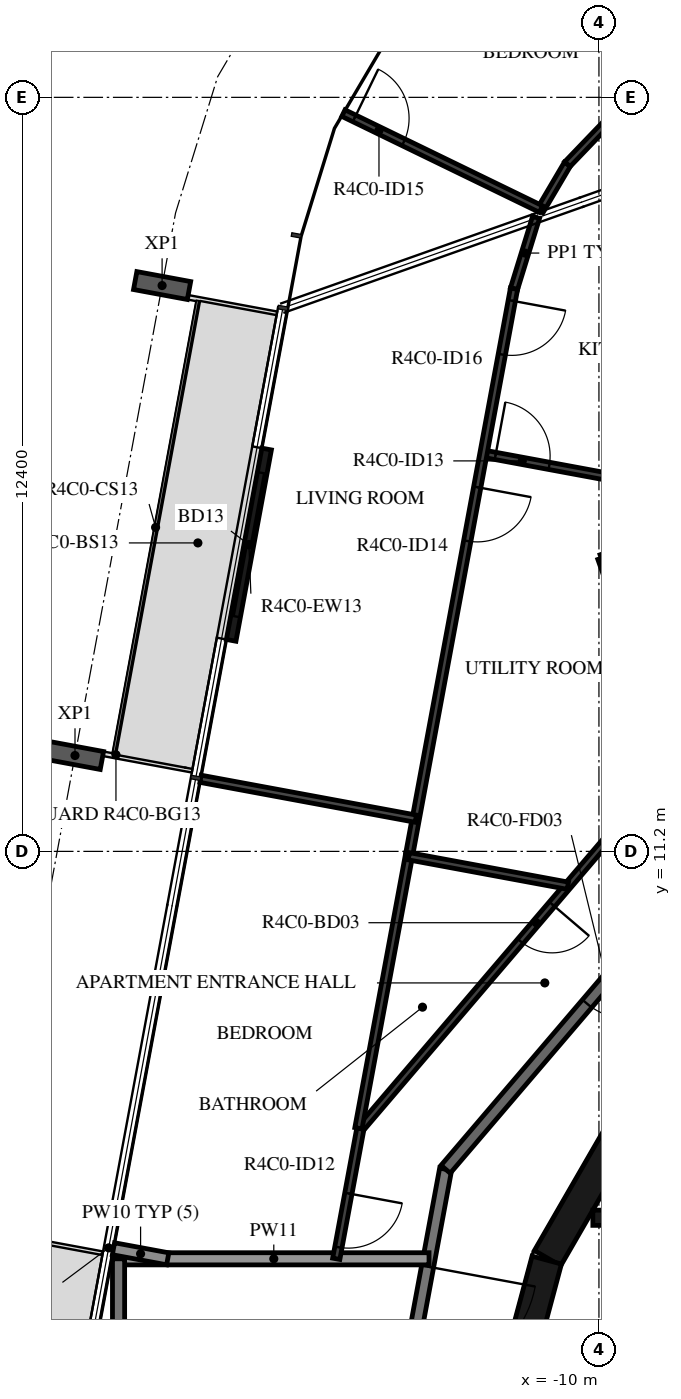
"""IFC4 building model, lengths in metres.
Left out: names, types, materials, properties, quantities, classifications, styles, units other than length and angle.
Written with IfcOpenShell. Run it as: python <this file> out.ifc"""

import sys

from ifc_helpers import new_model, si_unit, direction, frame, frame_2d, origin, origin_2d, place, context, subcontext, project, spatial, rectangle, i_section, extrude, element, fill, save


model = new_model("IFC4")
c1 = context("Model", 3, precision=1e-05, world=origin(), true_north=direction((0.0, 1.0)))
c2 = subcontext(c1, "Body", "Model", "MODEL_VIEW")
j1 = project(units=[si_unit("LENGTHUNIT", "METRE"), si_unit("PLANEANGLEUNIT", "RADIAN")], contexts=[c1])
p1 = place(None, origin())
s1 = spatial("IfcSite", under=j1, at=p1, CompositionType="ELEMENT")
p2 = place(p1, origin())
s2 = spatial("IfcBuilding", under=s1, at=p2, CompositionType="ELEMENT")
p3 = place(p2, frame((0.0, 0.0, 172.7)))
s3 = spatial("IfcBuildingStorey", under=s2, at=p3, CompositionType="ELEMENT", Elevation=172.7)
for number, where, z_axis, x_axis in (
    (1, (-17.184, 20.505, -0.38), (0.0, 0.0, 1.0), (0.182, 0.983, 0.0)),
    (2, (-18.616, 12.777, -0.38), (0.0, 0.0, 1.0), (0.182, 0.983, 0.0)),
):
    element("IfcColumn", number, at=place(p3, frame(where, z_axis=z_axis, x_axis=x_axis)), inside=s3, PredefinedType="COLUMN", context=c2, shape_type="SweptSolid", body=[
        extrude(i_section(OverallWidth=0.3, OverallDepth=0.9, WebThickness=0.019, FlangeThickness=0.035, FilletRadius=0.03, at=origin_2d()), origin(), (0.0, 0.0, 1.0), 3.5),
    ])
p4 = place(p3, frame((-15.465, 17.817, 0.0), z_axis=(0.0, 0.0, 1.0), x_axis=(-0.182201278434, -0.983261254264, 0.0)))
e3 = element("IfcWall", 3, at=p4, inside=s3, PredefinedType="STANDARD", context=c2, shape_type="SweptSolid", body=[
    extrude(rectangle(XDim=3.2, YDim=0.16, at=frame_2d((1.6, 0.0))), origin(), (0.0, 0.0, 1.0), 3.12),
])
p5 = place(p4, frame((0.4, 0.0, 0.0)))
e4 = element("IfcOpeningElement", 4, at=p5, cuts=e3, PredefinedType="OPENING", context=c2, shape_type="SweptSolid", body=[
    extrude(rectangle(XDim=2.4, YDim=2.4, at=frame_2d((1.2, 1.2))), frame((0.0, 0.09, 0.0), z_axis=(0.0, -1.0, 0.0), x_axis=(1.0, 0.0, 0.0)), (0.0, 0.0, 1.0), 0.18),
])
for number, where, z_axis, x_axis in (
    (5, (-9.329, 7.137, 0.0), (0.0, 0.0, 1.0), (-0.5, -0.866, 0.0)),
    (6, (-10.858, 4.479, 0.0), (0.0, 0.0, 1.0), (-0.259, -0.966, 0.0)),
):
    element("IfcWall", number, at=place(p3, frame(where, z_axis=z_axis, x_axis=x_axis)), inside=s3, PredefinedType="SHEAR", context=c2, shape_type="SweptSolid", body=[
        extrude(rectangle(XDim=3.033, YDim=0.5, at=frame_2d((1.516, 0.0))), origin(), (0.0, 0.0, 1.0), 3.12),
    ])
p6 = place(p3, frame((-7.0, 5.175, 0.0), z_axis=(0.0, 0.0, 1.0), x_axis=(-1.0, 0.0, 0.0)))
e7 = element("IfcWall", 7, at=p6, inside=s3, PredefinedType="SHEAR", context=c2, shape_type="SweptSolid", body=[
    extrude(rectangle(XDim=3.1, YDim=0.25, at=frame_2d((1.55, 0.0))), origin(), (0.0, 0.0, 1.0), 3.12),
])
p7 = place(p3, frame((-12.521, 5.972, 0.0), z_axis=(0.0, 0.0, 1.0), x_axis=(-0.182251559718, -0.983251935661, 0.0)))
e8 = element("IfcWall", 8, at=p7, inside=s3, PredefinedType="STANDARD", context=c2, shape_type="SweptSolid", body=[
    extrude(rectangle(XDim=5.117, YDim=0.2, at=frame_2d((2.559, 0.0))), origin(), (0.0, 0.0, 1.0), 3.12),
])
p8 = place(p7, frame((1.627, 0.0, 0.0)))
e9 = element("IfcOpeningElement", 9, at=p8, cuts=e8, PredefinedType="OPENING", context=c2, shape_type="SweptSolid", body=[
    extrude(rectangle(XDim=1.8, YDim=2.1, at=frame_2d((0.9, 1.05))), frame((0.0, 0.11, 0.0), z_axis=(0.0, -1.0, 0.0), x_axis=(1.0, 0.0, 0.0)), (0.0, 0.0, 1.0), 0.22),
])
p9 = place(p3, frame((-7.858, 11.433, 0.0), z_axis=(0.0, 0.0, 1.0), x_axis=(-0.649440801937, -0.760412154545, 0.0)))
e10 = element("IfcWall", 10, at=p9, inside=s3, PredefinedType="STANDARD", context=c2, shape_type="SweptSolid", body=[
    extrude(rectangle(XDim=7.181, YDim=0.2, at=frame_2d((3.59, 0.0))), origin(), (0.0, 0.0, 1.0), 3.12),
])
p10 = place(p9, frame((2.6, 0.0, 0.0)))
e11 = element("IfcOpeningElement", 11, at=p10, cuts=e10, PredefinedType="OPENING", context=c2, shape_type="SweptSolid", body=[
    extrude(rectangle(XDim=1.0, YDim=2.1, at=frame_2d((0.5, 1.05))), frame((0.0, 0.11, 0.0), z_axis=(0.0, -1.0, 0.0), x_axis=(1.0, 0.0, 0.0)), (0.0, 0.0, 1.0), 0.22),
])
p11 = place(p3, frame((-12.794, 4.5, 0.0), z_axis=(0.0, 0.0, 1.0), x_axis=(-1.0, 0.0, 0.0)))
e12 = element("IfcWall", 12, at=p11, inside=s3, PredefinedType="STANDARD", context=c2, shape_type="SweptSolid", body=[
    extrude(rectangle(XDim=5.106, YDim=0.2, at=frame_2d((2.553, 0.0))), origin(), (0.0, 0.0, 1.0), 2.73),
])
p12 = place(p3, frame((-17.9, 4.5, 0.0), z_axis=(0.0, 0.0, 1.0), x_axis=(0.0, -1.0, 0.0)))
e13 = element("IfcWall", 13, at=p12, inside=s3, PredefinedType="STANDARD", context=c2, shape_type="SweptSolid", body=[
    extrude(rectangle(XDim=9.0, YDim=0.2, at=frame_2d((4.5, 0.0))), origin(), (0.0, 0.0, 1.0), 3.12),
])
p13 = place(p3, frame((-17.984, 4.665, 0.0), z_axis=(0.0, 0.0, 1.0), x_axis=(0.98328378843, -0.182079629313, 0.0)))
e14 = element("IfcWall", 14, at=p13, inside=s3, PredefinedType="STANDARD", context=c2, shape_type="SweptSolid", body=[
    extrude(rectangle(XDim=0.908, YDim=0.2, at=frame_2d((0.454, 0.0))), origin(), (0.0, 0.0, 1.0), 2.73),
])
p14 = place(p3, frame((-8.359, 16.588, 0.0), z_axis=(0.0, 0.0, 1.0), x_axis=(-0.942661115325, -0.333751436931, 0.0)))
e15 = element("IfcWall", 15, at=p14, inside=s3, PredefinedType="PARTITIONING", context=c2, shape_type="SweptSolid", body=[
    extrude(rectangle(XDim=1.7, YDim=0.12, at=frame_2d((0.85, 0.0))), origin(), (0.0, 0.0, 1.0), 3.12),
])
p15 = place(p3, frame((-9.961, 16.021, 0.0), z_axis=(0.0, 0.0, 1.0), x_axis=(0.333803930912, -0.94264252806, 0.0)))
e16 = element("IfcWall", 16, at=p15, inside=s3, PredefinedType="PARTITIONING", context=c2, shape_type="SweptSolid", body=[
    extrude(rectangle(XDim=3.556, YDim=0.12, at=frame_2d((1.778, 0.0))), origin(), (0.0, 0.0, 1.0), 3.12),
])
p16 = place(p3, frame((-8.774, 12.669, 0.0), z_axis=(0.0, 0.0, 1.0), x_axis=(-0.649446157105, -0.760407580855, 0.0)))
e17 = element("IfcWall", 17, at=p16, inside=s3, PredefinedType="PARTITIONING", context=c2, shape_type="SweptSolid", body=[
    extrude(rectangle(XDim=7.927, YDim=0.12, at=frame_2d((3.964, 0.0))), origin(), (0.0, 0.0, 1.0), 3.12),
])
p17 = place(p16, frame((3.074, 0.0, 0.0)))
e18 = element("IfcOpeningElement", 18, at=p17, cuts=e17, PredefinedType="OPENING", context=c2, shape_type="SweptSolid", body=[
    extrude(rectangle(XDim=0.8, YDim=2.1, at=frame_2d((0.4, 1.05))), frame((0.0, 0.07, 0.0), z_axis=(0.0, -1.0, 0.0), x_axis=(1.0, 0.0, 0.0)), (0.0, 0.0, 1.0), 0.14),
])
p18 = place(p3, frame((-13.923, 6.641, 0.0), z_axis=(0.0, 0.0, 1.0), x_axis=(-0.182209715759, -0.983259690765, 0.0)))
e19 = element("IfcWall", 19, at=p18, inside=s3, PredefinedType="PARTITIONING", context=c2, shape_type="SweptSolid", body=[
    extrude(rectangle(XDim=2.177, YDim=0.12, at=frame_2d((1.089, 0.0))), origin(), (0.0, 0.0, 1.0), 3.12),
])
p19 = place(p18, frame((1.083, 0.0, 0.0)))
e20 = element("IfcOpeningElement", 20, at=p19, cuts=e19, PredefinedType="OPENING", context=c2, shape_type="SweptSolid", body=[
    extrude(rectangle(XDim=0.9, YDim=2.1, at=frame_2d((0.45, 1.05))), frame((0.0, 0.07, 0.0), z_axis=(0.0, -1.0, 0.0), x_axis=(1.0, 0.0, 0.0)), (0.0, 0.0, 1.0), 0.14),
])
p20 = place(p3, frame((-13.955, 6.647, 0.0), z_axis=(0.0, 0.0, 1.0), x_axis=(0.182264522222, 0.983249532896, 0.0)))
e21 = element("IfcWall", 21, at=p20, inside=s3, PredefinedType="PARTITIONING", context=c2, shape_type="SweptSolid", body=[
    extrude(rectangle(XDim=4.589, YDim=0.12, at=frame_2d((2.294, 0.0))), origin(), (0.0, 0.0, 1.0), 3.12),
])
p21 = place(p3, frame((-10.974, 21.728, 0.0), z_axis=(0.0, 0.0, 1.0), x_axis=(0.507353148194, 0.861738233466, 0.0)))
e22 = element("IfcWall", 22, at=p21, inside=s3, PredefinedType="PARTITIONING", context=c2, shape_type="SweptSolid", body=[
    extrude(rectangle(XDim=0.897, YDim=0.12, at=frame_2d((0.448, 0.0))), origin(), (0.0, 0.0, 1.0), 3.12),
])
p22 = place(p3, frame((-10.519, 22.501, 0.0), z_axis=(0.0, 0.0, 1.0), x_axis=(0.69266189308, 0.721262436201, 0.0)))
e23 = element("IfcWall", 23, at=p22, inside=s3, PredefinedType="PARTITIONING", context=c2, shape_type="SweptSolid", body=[
    extrude(rectangle(XDim=1.016, YDim=0.12, at=frame_2d((0.508, 0.0))), origin(), (0.0, 0.0, 1.0), 3.12),
])
p23 = place(p3, frame((-14.202, 23.341, 0.0), z_axis=(0.0, 0.0, 1.0), x_axis=(0.899466404534, -0.436989916491, 0.0)))
e24 = element("IfcWall", 24, at=p23, inside=s3, PredefinedType="PARTITIONING", context=c2, shape_type="SweptSolid", body=[
    extrude(rectangle(XDim=3.611, YDim=0.12, at=frame_2d((1.806, 0.0))), origin(), (0.0, 0.0, 1.0), 3.12),
])
p24 = place(p23, frame((0.2, 0.0, 0.0)))
e25 = element("IfcOpeningElement", 25, at=p24, cuts=e24, PredefinedType="OPENING", context=c2, shape_type="SweptSolid", body=[
    extrude(rectangle(XDim=0.9, YDim=2.1, at=frame_2d((0.45, 1.05))), frame((0.0, 0.07, 0.0), z_axis=(0.0, -1.0, 0.0), x_axis=(1.0, 0.0, 0.0)), (0.0, 0.0, 1.0), 0.14),
])
p25 = place(p3, frame((-11.899, 17.74, 0.0), z_axis=(0.0, 0.0, 1.0), x_axis=(0.983254721409, -0.182236529889, 0.0)))
e26 = element("IfcWall", 26, at=p25, inside=s3, PredefinedType="PARTITIONING", context=c2, shape_type="SweptSolid", body=[
    extrude(rectangle(XDim=6.114, YDim=0.12, at=frame_2d((3.057, 0.0))), origin(), (0.0, 0.0, 1.0), 3.12),
])
p26 = place(p25, frame((0.2, 0.0, 0.0)))
e27 = element("IfcOpeningElement", 27, at=p26, cuts=e26, PredefinedType="OPENING", context=c2, shape_type="SweptSolid", body=[
    extrude(rectangle(XDim=0.9, YDim=2.1, at=frame_2d((0.45, 1.05))), frame((0.0, 0.07, 0.0), z_axis=(0.0, -1.0, 0.0), x_axis=(1.0, 0.0, 0.0)), (0.0, 0.0, 1.0), 0.14),
])
p27 = place(p3, frame((-11.034, 21.625, 0.0), z_axis=(0.0, 0.0, 1.0), x_axis=(-0.295260042089, -0.955416928647, 0.0)))
e28 = element("IfcWall", 28, at=p27, inside=s3, PredefinedType="PARTITIONING", context=c2, shape_type="SweptSolid", body=[
    extrude(rectangle(XDim=1.227, YDim=0.12, at=frame_2d((0.614, 0.0))), origin(), (0.0, 0.0, 1.0), 3.12),
])
p28 = place(p3, frame((-11.396, 20.453, 0.0), z_axis=(0.0, 0.0, 1.0), x_axis=(-0.182223370439, -0.983257160292, 0.0)))
e29 = element("IfcWall", 29, at=p28, inside=s3, PredefinedType="PARTITIONING", context=c2, shape_type="SweptSolid", body=[
    extrude(rectangle(XDim=9.452, YDim=0.12, at=frame_2d((4.726, 0.0))), origin(), (0.0, 0.0, 1.0), 3.12),
])
p29 = place(p28, frame((3.319, 0.0, 0.0)))
e30 = element("IfcOpeningElement", 30, at=p29, cuts=e29, PredefinedType="OPENING", context=c2, shape_type="SweptSolid", body=[
    extrude(rectangle(XDim=0.9, YDim=2.1, at=frame_2d((0.45, 1.05))), frame((0.0, 0.07, 0.0), z_axis=(0.0, -1.0, 0.0), x_axis=(1.0, 0.0, 0.0)), (0.0, 0.0, 1.0), 0.14),
])
p30 = place(p28, frame((0.2, 0.0, 0.0)))
e31 = element("IfcOpeningElement", 31, at=p30, cuts=e29, PredefinedType="OPENING", context=c2, shape_type="SweptSolid", body=[
    extrude(rectangle(XDim=0.9, YDim=2.1, at=frame_2d((0.45, 1.05))), frame((0.0, 0.07, 0.0), z_axis=(0.0, -1.0, 0.0), x_axis=(1.0, 0.0, 0.0)), (0.0, 0.0, 1.0), 0.14),
])
p31 = place(p3, frame((-13.126, 11.12, 0.0), z_axis=(0.0, 0.0, 1.0), x_axis=(0.983257646361, -0.182220747645, 0.0)))
e32 = element("IfcWall", 32, at=p31, inside=s3, PredefinedType="PARTITIONING", context=c2, shape_type="SweptSolid", body=[
    extrude(rectangle(XDim=2.659, YDim=0.12, at=frame_2d((1.33, 0.0))), origin(), (0.0, 0.0, 1.0), 3.12),
])
p32 = place(p3, frame((-16.552, 12.394, 0.0), z_axis=(0.0, 0.0, 1.0), x_axis=(0.983257712156, -0.182220392618, 0.0)))
e33 = element("IfcWall", 33, at=p32, inside=s3, PredefinedType="PARTITIONING", context=c2, shape_type="SweptSolid", body=[
    extrude(rectangle(XDim=3.6, YDim=0.12, at=frame_2d((1.8, 0.0))), origin(), (0.0, 0.0, 1.0), 2.73),
])
p33 = place(p5, origin())
e34 = element("IfcDoor", 34, at=p33, inside=s3, OperationType="DOUBLE_DOOR_SLIDING", PredefinedType="DOOR", context=c2, shape_type="SweptSolid", body=[
    extrude(rectangle(XDim=2.4, YDim=2.4, at=frame_2d((1.2, 1.2))), frame((0.0, 0.025, 0.0), z_axis=(0.0, -1.0, 0.0), x_axis=(1.0, 0.0, 0.0)), (0.0, 0.0, 1.0), 0.05),
])
fill(e4, e34)
p34 = place(p10, origin())
e35 = element("IfcDoor", 35, at=p34, inside=s3, OperationType="SINGLE_SWING_LEFT", PredefinedType="DOOR", context=c2, shape_type="SweptSolid", body=[
    extrude(rectangle(XDim=1.0, YDim=2.1, at=frame_2d((0.5, 1.05))), frame((0.0, 0.025, 0.0), z_axis=(0.0, -1.0, 0.0), x_axis=(1.0, 0.0, 0.0)), (0.0, 0.0, 1.0), 0.05),
])
fill(e11, e35)
p35 = place(p17, origin())
e36 = element("IfcDoor", 36, at=p35, inside=s3, OperationType="SINGLE_SWING_LEFT", PredefinedType="DOOR", context=c2, shape_type="SweptSolid", body=[
    extrude(rectangle(XDim=0.8, YDim=2.1, at=frame_2d((0.4, 1.05))), frame((0.0, 0.025, 0.0), z_axis=(0.0, -1.0, 0.0), x_axis=(1.0, 0.0, 0.0)), (0.0, 0.0, 1.0), 0.05),
])
fill(e18, e36)
p36 = place(p19, origin())
e37 = element("IfcDoor", 37, at=p36, inside=s3, OperationType="SINGLE_SWING_LEFT", PredefinedType="DOOR", context=c2, shape_type="SweptSolid", body=[
    extrude(rectangle(XDim=0.9, YDim=2.1, at=frame_2d((0.45, 1.05))), frame((0.0, 0.025, 0.0), z_axis=(0.0, -1.0, 0.0), x_axis=(1.0, 0.0, 0.0)), (0.0, 0.0, 1.0), 0.05),
])
fill(e20, e37)
p37 = place(p26, origin())
e38 = element("IfcDoor", 38, at=p37, inside=s3, OperationType="SINGLE_SWING_LEFT", PredefinedType="DOOR", context=c2, shape_type="SweptSolid", body=[
    extrude(rectangle(XDim=0.9, YDim=2.1, at=frame_2d((0.45, 1.05))), frame((0.0, 0.025, 0.0), z_axis=(0.0, -1.0, 0.0), x_axis=(1.0, 0.0, 0.0)), (0.0, 0.0, 1.0), 0.05),
])
fill(e27, e38)
p38 = place(p29, origin())
e39 = element("IfcDoor", 39, at=p38, inside=s3, OperationType="SINGLE_SWING_LEFT", PredefinedType="DOOR", context=c2, shape_type="SweptSolid", body=[
    extrude(rectangle(XDim=0.9, YDim=2.1, at=frame_2d((0.45, 1.05))), frame((0.0, 0.025, 0.0), z_axis=(0.0, -1.0, 0.0), x_axis=(1.0, 0.0, 0.0)), (0.0, 0.0, 1.0), 0.05),
])
fill(e30, e39)
p39 = place(p24, origin())
e40 = element("IfcDoor", 40, at=p39, inside=s3, OperationType="SINGLE_SWING_LEFT", PredefinedType="DOOR", context=c2, shape_type="SweptSolid", body=[
    extrude(rectangle(XDim=0.9, YDim=2.1, at=frame_2d((0.45, 1.05))), frame((0.0, 0.025, 0.0), z_axis=(0.0, -1.0, 0.0), x_axis=(1.0, 0.0, 0.0)), (0.0, 0.0, 1.0), 0.05),
])
fill(e25, e40)
p40 = place(p30, origin())
e41 = element("IfcDoor", 41, at=p40, inside=s3, OperationType="SINGLE_SWING_RIGHT", PredefinedType="DOOR", context=c2, shape_type="SweptSolid", body=[
    extrude(rectangle(XDim=0.9, YDim=2.1, at=frame_2d((0.45, 1.05))), frame((0.0, 0.025, 0.0), z_axis=(0.0, -1.0, 0.0), x_axis=(1.0, 0.0, 0.0)), (0.0, 0.0, 1.0), 0.05),
])
fill(e31, e41)
p41 = place(p8, origin())
e42 = element("IfcDoor", 42, at=p41, inside=s3, OperationType="DOUBLE_DOOR_SINGLE_SWING", PredefinedType="DOOR", context=c2, shape_type="SweptSolid", body=[
    extrude(rectangle(XDim=1.8, YDim=2.1, at=frame_2d((0.9, 1.05))), frame((0.0, 0.025, 0.0), z_axis=(0.0, -1.0, 0.0), x_axis=(1.0, 0.0, 0.0)), (0.0, 0.0, 1.0), 0.05),
])
fill(e9, e42)
save(model, sys.argv[1])
